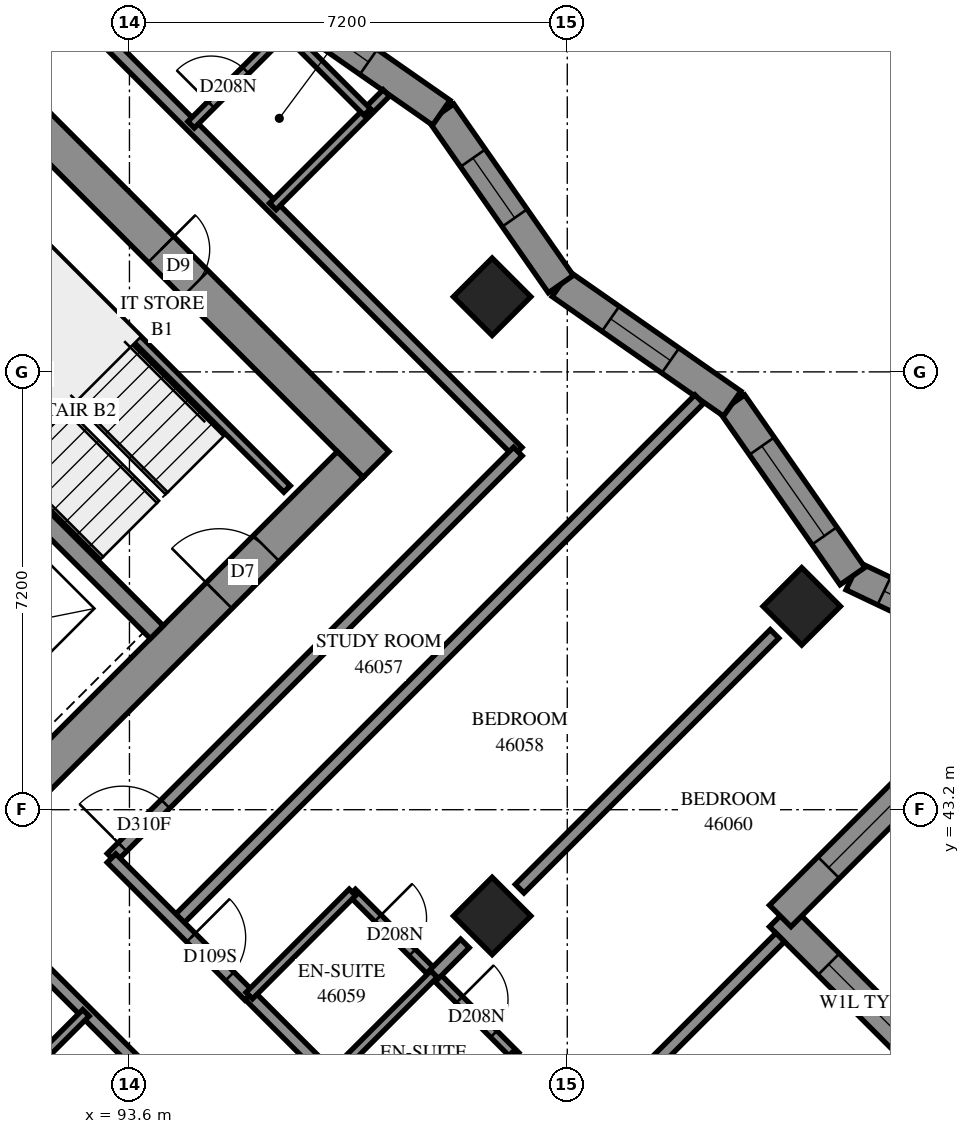
"""IFC4 building model, lengths in metres.
Left out: names, types, materials, properties, quantities, classifications, styles, units other than length and angle.
Written with IfcOpenShell. Run it as: python <this file> out.ifc"""

import sys

from ifc_helpers import new_model, si_unit, direction, frame, frame_2d, origin, origin_2d, place, context, subcontext, project, spatial, polyline, rectangle, outline, extrude, element, fill, save


model = new_model("IFC4")
c1 = context("Model", 3, precision=1e-05, world=origin(), true_north=direction((0.0, 1.0)))
c2 = subcontext(c1, "Body", "Model", "MODEL_VIEW")
j1 = project(units=[si_unit("LENGTHUNIT", "METRE"), si_unit("PLANEANGLEUNIT", "RADIAN")], contexts=[c1])
p1 = place(None, origin())
s1 = spatial("IfcSite", under=j1, at=p1, CompositionType="ELEMENT")
p2 = place(p1, origin())
s2 = spatial("IfcBuilding", under=s1, at=p2, CompositionType="ELEMENT")
p3 = place(p2, frame((0.0, 0.0, 169.4)))
s3 = spatial("IfcBuildingStorey", under=s2, at=p3, CompositionType="ELEMENT", Elevation=169.4)
for number, where, z_axis, x_axis in (
    (1, (99.565, 51.635, 0.0), (0.0, 0.0, 1.0), (0.707, -0.707, 0.0)),
    (2, (104.656, 46.544, 0.0), (0.0, 0.0, 1.0), (0.707, -0.707, 0.0)),
    (3, (99.565, 41.453, 0.0), (0.0, 0.0, 1.0), (0.707, -0.707, 0.0)),
):
    element("IfcColumn", number, at=place(p3, frame(where, z_axis=z_axis, x_axis=x_axis)), inside=s3, PredefinedType="COLUMN", context=c2, shape_type="SweptSolid", body=[
        extrude(rectangle(XDim=0.9, YDim=0.9, at=origin_2d()), origin(), (0.0, 0.0, 1.0), 3.1),
    ])
p4 = place(p3, frame((86.625, 59.908, -0.3), z_axis=(0.0, 0.0, 1.0), x_axis=(0.7071067812, -0.7071067812, 0.0)))
e4 = element("IfcWall", 4, at=p4, inside=s3, PredefinedType="SHEAR", context=c2, shape_type="SweptSolid", body=[
    extrude(rectangle(XDim=15.6, YDim=0.6, at=frame_2d((7.8, 0.0))), origin(), (0.0, 0.0, 1.0), 2.7),
])
p5 = place(p4, frame((10.6, 0.0, 0.3)))
e5 = element("IfcOpeningElement", 5, at=p5, cuts=e4, PredefinedType="OPENING", context=c2, shape_type="SweptSolid", body=[
    extrude(rectangle(XDim=0.8, YDim=2.1, at=frame_2d((0.4, 1.05))), frame((0.0, 0.31, 0.0), z_axis=(0.0, -1.0, 0.0), x_axis=(1.0, 0.0, 0.0)), (0.0, 0.0, 1.0), 0.62),
])
p6 = place(p3, frame((87.049, 38.695, -0.3), z_axis=(0.0, 0.0, 1.0), x_axis=(0.7071067812, 0.7071067812, 0.0)))
e6 = element("IfcWall", 6, at=p6, inside=s3, PredefinedType="SHEAR", context=c2, shape_type="SweptSolid", body=[
    extrude(rectangle(XDim=14.4, YDim=0.6, at=frame_2d((7.2, 0.0))), origin(), (0.0, 0.0, 1.0), 2.7),
])
p7 = place(p6, frame((4.55, 0.0, 0.3)))
e7 = element("IfcOpeningElement", 7, at=p7, cuts=e6, PredefinedType="OPENING", context=c2, shape_type="SweptSolid", body=[
    extrude(rectangle(XDim=1.1, YDim=2.1, at=frame_2d((0.55, 1.05))), frame((0.0, 0.31, 0.0), z_axis=(0.0, -1.0, 0.0), x_axis=(1.0, 0.0, 0.0)), (0.0, 0.0, 1.0), 0.62),
])
p8 = place(p6, frame((11.35, 0.0, 0.3)))
e8 = element("IfcOpeningElement", 8, at=p8, cuts=e6, PredefinedType="OPENING", context=c2, shape_type="SweptSolid", body=[
    extrude(rectangle(XDim=1.1, YDim=2.1, at=frame_2d((0.55, 1.05))), frame((0.0, 0.31, 0.0), z_axis=(0.0, -1.0, 0.0), x_axis=(1.0, 0.0, 0.0)), (0.0, 0.0, 1.0), 0.62),
])
p9 = place(p3, frame((88.958, 51.211, 0.0), z_axis=(0.0, 0.0, 1.0), x_axis=(0.7070998367, -0.7071137256, 0.0)))
e9 = element("IfcWall", 9, at=p9, inside=s3, PredefinedType="SOLIDWALL", context=c2, shape_type="SweptSolid", body=[
    extrude(rectangle(XDim=7.2, YDim=0.3, at=frame_2d((3.6, 0.0))), origin(), (0.0, 0.0, 1.0), 3.1),
])
p10 = place(p3, frame((107.761, 37.994, 0.0), z_axis=(0.0, 0.0, 1.0), x_axis=(-0.7071170031, 0.7070965591, 0.0)))
e10 = element("IfcWall", 10, at=p10, inside=s3, PredefinedType="SOLIDWALL", context=c2, shape_type="SweptSolid", body=[
    extrude(outline(polyline([(-0.159, -0.25), (4.641, -0.25), (5.141, 0.25), (0.159, 0.25), (-0.159, -0.25)])), origin(), (0.0, 0.0, 1.0), 3.1),
])
p11 = place(p10, frame((1.966, 0.0, 0.6)))
e11 = element("IfcOpeningElement", 11, at=p11, cuts=e10, PredefinedType="OPENING", context=c2, shape_type="SweptSolid", body=[
    extrude(rectangle(XDim=1.8, YDim=1.9, at=frame_2d((0.9, 0.95))), frame((0.0, 0.26, 0.0), z_axis=(0.0, -1.0, 0.0), x_axis=(1.0, 0.0, 0.0)), (0.0, 0.0, 1.0), 0.52),
])
p12 = place(p3, frame((104.302, 41.453, 0.0), z_axis=(0.0, 0.0, 1.0), x_axis=(0.7071237335, 0.7070898285, 0.0)))
e12 = element("IfcWall", 12, at=p12, inside=s3, PredefinedType="SOLIDWALL", context=c2, shape_type="SweptSolid", body=[
    extrude(outline(polyline([(0.25, -0.25), (6.253, -0.25), (5.545, 0.25), (-0.25, 0.25), (0.25, -0.25)])), origin(), (0.0, 0.0, 1.0), 2.6),
])
p13 = place(p12, frame((1.125, 0.0, 0.6)))
e13 = element("IfcOpeningElement", 13, at=p13, cuts=e12, PredefinedType="OPENING", context=c2, shape_type="SweptSolid", body=[
    extrude(rectangle(XDim=1.8, YDim=1.9, at=frame_2d((0.9, 0.95))), frame((0.0, 0.26, 0.0), z_axis=(0.0, -1.0, 0.0), x_axis=(1.0, 0.0, 0.0)), (0.0, 0.0, 1.0), 0.52),
])
p14 = place(p12, frame((3.997, 0.0, 0.6)))
e14 = element("IfcOpeningElement", 14, at=p14, cuts=e12, PredefinedType="OPENING", context=c2, shape_type="SweptSolid", body=[
    extrude(rectangle(XDim=1.2, YDim=1.9, at=frame_2d((0.6, 0.95))), frame((0.0, 0.26, 0.0), z_axis=(0.0, -1.0, 0.0), x_axis=(1.0, 0.0, 0.0)), (0.0, 0.0, 1.0), 0.52),
])
p15 = place(p3, frame((108.473, 45.624, 0.0), z_axis=(0.0, 0.0, 1.0), x_axis=(-0.9031580638, 0.4293081781, 0.0)))
e15 = element("IfcWall", 15, at=p15, inside=s3, PredefinedType="SOLIDWALL", context=c2, shape_type="SweptSolid", body=[
    extrude(outline(polyline([(-0.354, -0.25), (3.236, -0.25), (3.369, 0.25), (0.354, 0.25), (-0.354, -0.25)])), origin(), (0.0, 0.0, 1.0), 2.6),
])
p16 = place(p15, frame((0.928, 0.0, 0.6)))
e16 = element("IfcOpeningElement", 16, at=p16, cuts=e15, PredefinedType="OPENING", context=c2, shape_type="SweptSolid", body=[
    extrude(rectangle(XDim=1.8, YDim=1.9, at=frame_2d((0.9, 0.95))), frame((0.0, 0.26, 0.0), z_axis=(0.0, -1.0, 0.0), x_axis=(1.0, 0.0, 0.0)), (0.0, 0.0, 1.0), 0.52),
])
p17 = place(p3, frame((105.491, 47.042, 0.0), z_axis=(0.0, 0.0, 1.0), x_axis=(-0.5720427166, 0.8202238295, 0.0)))
e17 = element("IfcWall", 17, at=p17, inside=s3, PredefinedType="SOLIDWALL", context=c2, shape_type="SweptSolid", body=[
    extrude(outline(polyline([(0.066, -0.25), (3.502, -0.25), (3.413, 0.25), (-0.066, 0.25), (0.066, -0.25)])), origin(), (0.0, 0.0, 1.0), 3.1),
])
p18 = place(p17, frame((0.807, 0.0, 0.6)))
e18 = element("IfcOpeningElement", 18, at=p18, cuts=e17, PredefinedType="OPENING", context=c2, shape_type="SweptSolid", body=[
    extrude(rectangle(XDim=1.8, YDim=1.9, at=frame_2d((0.9, 0.95))), frame((0.0, 0.26, 0.0), z_axis=(0.0, -1.0, 0.0), x_axis=(1.0, 0.0, 0.0)), (0.0, 0.0, 1.0), 0.52),
])
p19 = place(p3, frame((103.513, 49.878, 0.0), z_axis=(0.0, 0.0, 1.0), x_axis=(-0.8202219009, 0.5720454818, 0.0)))
e19 = element("IfcWall", 19, at=p19, inside=s3, PredefinedType="SOLIDWALL", context=c2, shape_type="SweptSolid", body=[
    extrude(outline(polyline([(-0.045, -0.25), (3.392, -0.25), (3.481, 0.25), (0.045, 0.25), (-0.045, -0.25)])), origin(), (0.0, 0.0, 1.0), 3.1),
])
p20 = place(p19, frame((1.239, 0.0, 0.45)))
e20 = element("IfcOpeningElement", 20, at=p20, cuts=e19, PredefinedType="OPENING", context=c2, shape_type="SweptSolid", body=[
    extrude(rectangle(XDim=1.2, YDim=2.5, at=frame_2d((0.6, 1.25))), frame((0.0, 0.26, 0.0), z_axis=(0.0, -1.0, 0.0), x_axis=(1.0, 0.0, 0.0)), (0.0, 0.0, 1.0), 0.52),
])
p21 = place(p3, frame((100.694, 51.844, 0.0), z_axis=(0.0, 0.0, 1.0), x_axis=(-0.5720454818, 0.8202219009, 0.0)))
e21 = element("IfcWall", 21, at=p21, inside=s3, PredefinedType="SOLIDWALL", context=c2, shape_type="SweptSolid", body=[
    extrude(outline(polyline([(0.045, -0.25), (3.481, -0.25), (3.392, 0.25), (-0.045, 0.25), (0.045, -0.25)])), origin(), (0.0, 0.0, 1.0), 3.1),
])
p22 = place(p21, frame((1.327, 0.0, 0.45)))
e22 = element("IfcOpeningElement", 22, at=p22, cuts=e21, PredefinedType="OPENING", context=c2, shape_type="SweptSolid", body=[
    extrude(rectangle(XDim=1.2, YDim=2.5, at=frame_2d((0.6, 1.25))), frame((0.0, 0.26, 0.0), z_axis=(0.0, -1.0, 0.0), x_axis=(1.0, 0.0, 0.0)), (0.0, 0.0, 1.0), 0.52),
])
p23 = place(p3, frame((98.728, 54.662, 0.0), z_axis=(0.0, 0.0, 1.0), x_axis=(-0.8202082464, 0.5720650597, 0.0)))
e23 = element("IfcWall", 23, at=p23, inside=s3, PredefinedType="SOLIDWALL", context=c2, shape_type="SweptSolid", body=[
    extrude(outline(polyline([(-0.045, -0.25), (3.392, -0.25), (3.481, 0.25), (0.045, 0.25), (-0.045, -0.25)])), origin(), (0.0, 0.0, 1.0), 3.1),
])
p24 = place(p23, frame((1.459, 0.0, 0.45)))
e24 = element("IfcOpeningElement", 24, at=p24, cuts=e23, PredefinedType="OPENING", context=c2, shape_type="SweptSolid", body=[
    extrude(rectangle(XDim=1.2, YDim=2.5, at=frame_2d((0.6, 1.25))), frame((0.0, 0.26, 0.0), z_axis=(0.0, -1.0, 0.0), x_axis=(1.0, 0.0, 0.0)), (0.0, 0.0, 1.0), 0.52),
])
p25 = place(p3, frame((91.313, 53.354, 0.0), z_axis=(0.0, 0.0, 1.0), x_axis=(0.7071140275, -0.7070995348, 0.0)))
e25 = element("IfcWall", 25, at=p25, inside=s3, PredefinedType="PARTITIONING", context=c2, shape_type="SweptSolid", body=[
    extrude(rectangle(XDim=6.9, YDim=0.15, at=frame_2d((3.45, 0.0))), origin(), (0.0, 0.0, 1.0), 3.1),
])
p26 = place(p3, frame((94.366, 41.348, 0.0), z_axis=(0.0, 0.0, 1.0), x_axis=(0.7071108904, 0.707102672, 0.0)))
e26 = element("IfcWall", 26, at=p26, inside=s3, PredefinedType="PARTITIONING", context=c2, shape_type="SweptSolid", body=[
    extrude(rectangle(XDim=12.168, YDim=0.2, at=frame_2d((6.084, 0.0))), origin(), (0.0, 0.0, 1.0), 3.1),
])
p27 = place(p3, frame((91.967, 40.785, 0.0), z_axis=(0.0, 0.0, 1.0), x_axis=(0.7071067812, -0.7071067812, 0.0)))
e27 = element("IfcWall", 27, at=p27, inside=s3, PredefinedType="PARTITIONING", context=c2, shape_type="SweptSolid", body=[
    extrude(rectangle(XDim=12.1, YDim=0.2, at=frame_2d((6.05, 0.0))), origin(), (0.0, 0.0, 1.0), 3.1),
])
p28 = place(p27, frame((3.448, 0.0, 0.0)))
e28 = element("IfcOpeningElement", 28, at=p28, cuts=e27, PredefinedType="OPENING", context=c2, shape_type="SweptSolid", body=[
    extrude(rectangle(XDim=0.9, YDim=2.1, at=frame_2d((0.45, 1.05))), frame((0.0, 0.11, 0.0), z_axis=(0.0, -1.0, 0.0), x_axis=(1.0, 0.0, 0.0)), (0.0, 0.0, 1.0), 0.22),
])
p29 = place(p27, frame((8.457, 0.0, 0.0)))
e29 = element("IfcOpeningElement", 29, at=p29, cuts=e27, PredefinedType="OPENING", context=c2, shape_type="SweptSolid", body=[
    extrude(rectangle(XDim=1.0, YDim=2.1, at=frame_2d((0.5, 1.05))), frame((0.0, 0.11, 0.0), z_axis=(0.0, -1.0, 0.0), x_axis=(1.0, 0.0, 0.0)), (0.0, 0.0, 1.0), 0.22),
])
p30 = place(p3, frame((91.755, 57.317, 0.0), z_axis=(0.0, 0.0, 1.0), x_axis=(0.7071067812, -0.7071067812, 0.0)))
e30 = element("IfcWall", 30, at=p30, inside=s3, PredefinedType="PARTITIONING", context=c2, shape_type="SweptSolid", body=[
    extrude(rectangle(XDim=11.639, YDim=0.2, at=frame_2d((5.819, 0.0))), origin(), (0.0, 0.0, 1.0), 3.1),
])
p31 = place(p3, frame((93.306, 42.408, 0.0), z_axis=(0.0, 0.0, 1.0), x_axis=(0.7071067812, 0.7071067812, 0.0)))
e31 = element("IfcWall", 31, at=p31, inside=s3, PredefinedType="PARTITIONING", context=c2, shape_type="SweptSolid", body=[
    extrude(rectangle(XDim=9.45, YDim=0.2, at=frame_2d((4.725, 0.0))), origin(), (0.0, 0.0, 1.0), 3.1),
])
p32 = place(p31, frame((0.253, 0.0, 0.0)))
e32 = element("IfcOpeningElement", 32, at=p32, cuts=e31, PredefinedType="OPENING", context=c2, shape_type="SweptSolid", body=[
    extrude(rectangle(XDim=1.0, YDim=2.1, at=frame_2d((0.5, 1.05))), frame((0.0, 0.11, 0.0), z_axis=(0.0, -1.0, 0.0), x_axis=(1.0, 0.0, 0.0)), (0.0, 0.0, 1.0), 0.22),
])
p33 = place(p3, frame((99.458, 36.256, 0.0), z_axis=(0.0, 0.0, 1.0), x_axis=(0.7071067812, 0.7071067812, 0.0)))
e33 = element("IfcWall", 33, at=p33, inside=s3, PredefinedType="PARTITIONING", context=c2, shape_type="SweptSolid", body=[
    extrude(rectangle(XDim=6.85, YDim=0.2, at=frame_2d((3.425, 0.0))), origin(), (0.0, 0.0, 1.0), 3.1),
])
p34 = place(p3, frame((100.017, 41.901, 0.0), z_axis=(0.0, 0.0, 1.0), x_axis=(0.7072754814, 0.7069380408, 0.0)))
e34 = element("IfcWall", 34, at=p34, inside=s3, PredefinedType="PARTITIONING", context=c2, shape_type="SweptSolid", body=[
    extrude(rectangle(XDim=5.927, YDim=0.2, at=frame_2d((2.963, 0.0))), origin(), (0.0, 0.0, 1.0), 3.1),
])
p35 = place(p3, frame((97.263, 41.839, 0.0), z_axis=(0.0, 0.0, 1.0), x_axis=(0.7071067812, -0.7071067812, 0.0)))
e35 = element("IfcWall", 35, at=p35, inside=s3, PredefinedType="PARTITIONING", context=c2, shape_type="SweptSolid", body=[
    extrude(rectangle(XDim=3.801, YDim=0.15, at=frame_2d((1.901, 0.0))), origin(), (0.0, 0.0, 1.0), 3.1),
])
p36 = place(p35, frame((0.598, 0.0, 0.0)))
e36 = element("IfcOpeningElement", 36, at=p36, cuts=e35, PredefinedType="OPENING", context=c2, shape_type="SweptSolid", body=[
    extrude(rectangle(XDim=0.8, YDim=2.1, at=frame_2d((0.4, 1.05))), frame((0.0, 0.085, 0.0), z_axis=(0.0, -1.0, 0.0), x_axis=(1.0, 0.0, 0.0)), (0.0, 0.0, 1.0), 0.17),
])
p37 = place(p35, frame((2.493, 0.0, 0.0)))
e37 = element("IfcOpeningElement", 37, at=p37, cuts=e35, PredefinedType="OPENING", context=c2, shape_type="SweptSolid", body=[
    extrude(rectangle(XDim=0.8, YDim=2.1, at=frame_2d((0.4, 1.05))), frame((0.0, 0.085, 0.0), z_axis=(0.0, -1.0, 0.0), x_axis=(1.0, 0.0, 0.0)), (0.0, 0.0, 1.0), 0.17),
])
p38 = place(p3, frame((95.573, 40.148, 0.0), z_axis=(0.0, 0.0, 1.0), x_axis=(0.7068698107, -0.7073436723, 0.0)))
e38 = element("IfcWall", 38, at=p38, inside=s3, PredefinedType="PARTITIONING", context=c2, shape_type="SweptSolid", body=[
    extrude(rectangle(XDim=3.799, YDim=0.2, at=frame_2d((1.899, 0.0))), origin(), (0.0, 0.0, 1.0), 3.1),
])
p39 = place(p3, frame((93.305, 42.403, 0.0), z_axis=(0.0, 0.0, 1.0), x_axis=(0.7071067812, -0.7071067812, 0.0)))
e39 = element("IfcWall", 39, at=p39, inside=s3, PredefinedType="PARTITIONING", context=c2, shape_type="SweptSolid", body=[
    extrude(rectangle(XDim=3.199, YDim=0.2, at=frame_2d((1.599, 0.0))), origin(), (0.0, 0.0, 1.0), 3.1),
])
p40 = place(p39, frame((1.848, 0.0, 0.0)))
e40 = element("IfcOpeningElement", 40, at=p40, cuts=e39, PredefinedType="OPENING", context=c2, shape_type="SweptSolid", body=[
    extrude(rectangle(XDim=0.9, YDim=2.1, at=frame_2d((0.45, 1.05))), frame((0.0, 0.11, 0.0), z_axis=(0.0, -1.0, 0.0), x_axis=(1.0, 0.0, 0.0)), (0.0, 0.0, 1.0), 0.22),
])
p41 = place(p3, frame((95.957, 53.121, 0.0), z_axis=(0.0, 0.0, 1.0), x_axis=(0.7070878465, 0.7071257154, 0.0)))
e41 = element("IfcWall", 41, at=p41, inside=s3, PredefinedType="PARTITIONING", context=c2, shape_type="SweptSolid", body=[
    extrude(rectangle(XDim=2.641, YDim=0.15, at=frame_2d((1.32, 0.0))), origin(), (0.0, 0.0, 1.0), 3.1),
])
p42 = place(p3, frame((95.781, 56.402, 0.0), z_axis=(0.0, 0.0, 1.0), x_axis=(0.7071067812, -0.7071067812, 0.0)))
e42 = element("IfcWall", 42, at=p42, inside=s3, PredefinedType="PARTITIONING", context=c2, shape_type="SweptSolid", body=[
    extrude(rectangle(XDim=2.446, YDim=0.15, at=frame_2d((1.223, 0.0))), origin(), (0.0, 0.0, 1.0), 3.1),
])
for number, where, z_axis, x_axis in (
    (43, (95.571, 40.143, 0.0), (0.0, 0.0, 1.0), (0.707, 0.708, 0.0)),
    (44, (98.253, 37.461, 0.0), (0.0, 0.0, 1.0), (0.708, 0.707, 0.0)),
    (45, (91.189, 38.161, 0.0), (0.0, 0.0, 1.0), (0.707, 0.708, 0.0)),
):
    element("IfcWall", number, at=place(p3, frame(where, z_axis=z_axis, x_axis=x_axis)), inside=s3, PredefinedType="PARTITIONING", context=c2, shape_type="SweptSolid", body=[
        extrude(rectangle(XDim=2.4, YDim=0.15, at=frame_2d((1.2, 0.0))), origin(), (0.0, 0.0, 1.0), 3.1),
    ])
p43 = place(p3, frame((96.913, 38.803, 0.0), z_axis=(0.0, 0.0, 1.0), x_axis=(0.7071067812, 0.7071067812, 0.0)))
e46 = element("IfcWall", 46, at=p43, inside=s3, PredefinedType="PARTITIONING", context=c2, shape_type="SweptSolid", body=[
    extrude(rectangle(XDim=2.398, YDim=0.15, at=frame_2d((1.199, 0.0))), origin(), (0.0, 0.0, 1.0), 3.1),
])
p44 = place(p3, frame((94.614, 54.464, 0.0), z_axis=(0.0, 0.0, 1.0), x_axis=(0.7070850605, 0.7071285012, 0.0)))
e47 = element("IfcWall", 47, at=p44, inside=s3, PredefinedType="PARTITIONING", context=c2, shape_type="SweptSolid", body=[
    extrude(rectangle(XDim=2.302, YDim=0.15, at=frame_2d((1.151, 0.0))), origin(), (0.0, 0.0, 1.0), 3.1),
])
p45 = place(p44, frame((0.466, 0.0, 0.0)))
e48 = element("IfcOpeningElement", 48, at=p45, cuts=e47, PredefinedType="OPENING", context=c2, shape_type="SweptSolid", body=[
    extrude(rectangle(XDim=0.8, YDim=2.1, at=frame_2d((0.4, 1.05))), frame((0.0, 0.085, 0.0), z_axis=(0.0, -1.0, 0.0), x_axis=(1.0, 0.0, 0.0)), (0.0, 0.0, 1.0), 0.17),
])
p46 = place(p3, frame((98.613, 40.495, 0.0), z_axis=(0.0, 0.0, 1.0), x_axis=(0.7057051861, 0.7085056035, 0.0)))
e49 = element("IfcWall", 49, at=p46, inside=s3, PredefinedType="PARTITIONING", context=c2, shape_type="SweptSolid", body=[
    extrude(rectangle(XDim=0.714, YDim=0.2, at=frame_2d((0.357, 0.0))), origin(), (0.0, 0.0, 1.0), 3.1),
])
p47 = place(p11, origin())
e50 = element("IfcWindow", 50, at=p47, inside=s3, PartitioningType="SINGLE_PANEL", PredefinedType="WINDOW", context=c2, shape_type="SweptSolid", body=[
    extrude(rectangle(XDim=1.8, YDim=1.9, at=frame_2d((0.9, 0.95))), frame((0.0, 0.18, 0.0), z_axis=(0.0, -1.0, 0.0), x_axis=(1.0, 0.0, 0.0)), (0.0, 0.0, 1.0), 0.06),
])
fill(e11, e50)
p48 = place(p13, origin())
e51 = element("IfcWindow", 51, at=p48, inside=s3, PartitioningType="SINGLE_PANEL", PredefinedType="WINDOW", context=c2, shape_type="SweptSolid", body=[
    extrude(rectangle(XDim=1.8, YDim=1.9, at=frame_2d((0.9, 0.95))), frame((0.0, 0.18, 0.0), z_axis=(0.0, -1.0, 0.0), x_axis=(1.0, 0.0, 0.0)), (0.0, 0.0, 1.0), 0.06),
])
fill(e13, e51)
p49 = place(p16, origin())
e52 = element("IfcWindow", 52, at=p49, inside=s3, PartitioningType="SINGLE_PANEL", PredefinedType="WINDOW", context=c2, shape_type="SweptSolid", body=[
    extrude(rectangle(XDim=1.8, YDim=1.9, at=frame_2d((0.9, 0.95))), frame((0.0, 0.18, 0.0), z_axis=(0.0, -1.0, 0.0), x_axis=(1.0, 0.0, 0.0)), (0.0, 0.0, 1.0), 0.06),
])
fill(e16, e52)
p50 = place(p18, origin())
e53 = element("IfcWindow", 53, at=p50, inside=s3, PartitioningType="SINGLE_PANEL", PredefinedType="WINDOW", context=c2, shape_type="SweptSolid", body=[
    extrude(rectangle(XDim=1.8, YDim=1.9, at=frame_2d((0.9, 0.95))), frame((0.0, 0.18, 0.0), z_axis=(0.0, -1.0, 0.0), x_axis=(1.0, 0.0, 0.0)), (0.0, 0.0, 1.0), 0.06),
])
fill(e18, e53)
p51 = place(p20, origin())
e54 = element("IfcWindow", 54, at=p51, inside=s3, PartitioningType="SINGLE_PANEL", PredefinedType="WINDOW", context=c2, shape_type="SweptSolid", body=[
    extrude(rectangle(XDim=1.2, YDim=2.5, at=frame_2d((0.6, 1.25))), frame((0.0, 0.18, 0.0), z_axis=(0.0, -1.0, 0.0), x_axis=(1.0, 0.0, 0.0)), (0.0, 0.0, 1.0), 0.06),
])
fill(e20, e54)
p52 = place(p22, origin())
e55 = element("IfcWindow", 55, at=p52, inside=s3, PartitioningType="SINGLE_PANEL", PredefinedType="WINDOW", context=c2, shape_type="SweptSolid", body=[
    extrude(rectangle(XDim=1.2, YDim=2.5, at=frame_2d((0.6, 1.25))), frame((0.0, 0.18, 0.0), z_axis=(0.0, -1.0, 0.0), x_axis=(1.0, 0.0, 0.0)), (0.0, 0.0, 1.0), 0.06),
])
fill(e22, e55)
p53 = place(p24, origin())
e56 = element("IfcWindow", 56, at=p53, inside=s3, PartitioningType="SINGLE_PANEL", PredefinedType="WINDOW", context=c2, shape_type="SweptSolid", body=[
    extrude(rectangle(XDim=1.2, YDim=2.5, at=frame_2d((0.6, 1.25))), frame((0.0, 0.18, 0.0), z_axis=(0.0, -1.0, 0.0), x_axis=(1.0, 0.0, 0.0)), (0.0, 0.0, 1.0), 0.06),
])
fill(e24, e56)
p54 = place(p5, origin())
e57 = element("IfcDoor", 57, at=p54, inside=s3, OperationType="SINGLE_SWING_RIGHT", PredefinedType="DOOR", context=c2, shape_type="SweptSolid", body=[
    extrude(rectangle(XDim=0.8, YDim=2.1, at=frame_2d((0.4, 1.05))), frame((0.0, 0.025, 0.0), z_axis=(0.0, -1.0, 0.0), x_axis=(1.0, 0.0, 0.0)), (0.0, 0.0, 1.0), 0.05),
])
fill(e5, e57)
p55 = place(p8, origin())
e58 = element("IfcDoor", 58, at=p55, inside=s3, OperationType="SINGLE_SWING_RIGHT", PredefinedType="DOOR", context=c2, shape_type="SweptSolid", body=[
    extrude(rectangle(XDim=1.1, YDim=2.1, at=frame_2d((0.55, 1.05))), frame((0.0, 0.025, 0.0), z_axis=(0.0, -1.0, 0.0), x_axis=(1.0, 0.0, 0.0)), (0.0, 0.0, 1.0), 0.05),
])
fill(e8, e58)
p56 = place(p32, origin())
e59 = element("IfcDoor", 59, at=p56, inside=s3, OperationType="SINGLE_SWING_RIGHT", PredefinedType="DOOR", context=c2, shape_type="SweptSolid", body=[
    extrude(rectangle(XDim=1.0, YDim=2.1, at=frame_2d((0.5, 1.05))), frame((0.0, 0.025, 0.0), z_axis=(0.0, -1.0, 0.0), x_axis=(1.0, 0.0, 0.0)), (0.0, 0.0, 1.0), 0.05),
])
fill(e32, e59)
p57 = place(p40, origin())
e60 = element("IfcDoor", 60, at=p57, inside=s3, OperationType="SINGLE_SWING_RIGHT", PredefinedType="DOOR", context=c2, shape_type="SweptSolid", body=[
    extrude(rectangle(XDim=0.9, YDim=2.1, at=frame_2d((0.45, 1.05))), frame((0.0, 0.025, 0.0), z_axis=(0.0, -1.0, 0.0), x_axis=(1.0, 0.0, 0.0)), (0.0, 0.0, 1.0), 0.05),
])
fill(e40, e60)
p58 = place(p36, origin())
e61 = element("IfcDoor", 61, at=p58, inside=s3, OperationType="SINGLE_SWING_RIGHT", PredefinedType="DOOR", context=c2, shape_type="SweptSolid", body=[
    extrude(rectangle(XDim=0.8, YDim=2.1, at=frame_2d((0.4, 1.05))), frame((0.0, 0.025, 0.0), z_axis=(0.0, -1.0, 0.0), x_axis=(1.0, 0.0, 0.0)), (0.0, 0.0, 1.0), 0.05),
])
fill(e36, e61)
p59 = place(p37, origin())
e62 = element("IfcDoor", 62, at=p59, inside=s3, OperationType="SINGLE_SWING_RIGHT", PredefinedType="DOOR", context=c2, shape_type="SweptSolid", body=[
    extrude(rectangle(XDim=0.8, YDim=2.1, at=frame_2d((0.4, 1.05))), frame((0.0, 0.025, 0.0), z_axis=(0.0, -1.0, 0.0), x_axis=(1.0, 0.0, 0.0)), (0.0, 0.0, 1.0), 0.05),
])
fill(e37, e62)
p60 = place(p45, origin())
e63 = element("IfcDoor", 63, at=p60, inside=s3, OperationType="SINGLE_SWING_RIGHT", PredefinedType="DOOR", context=c2, shape_type="SweptSolid", body=[
    extrude(rectangle(XDim=0.8, YDim=2.1, at=frame_2d((0.4, 1.05))), frame((0.0, 0.025, 0.0), z_axis=(0.0, -1.0, 0.0), x_axis=(1.0, 0.0, 0.0)), (0.0, 0.0, 1.0), 0.05),
])
fill(e48, e63)
save(model, sys.argv[1])
